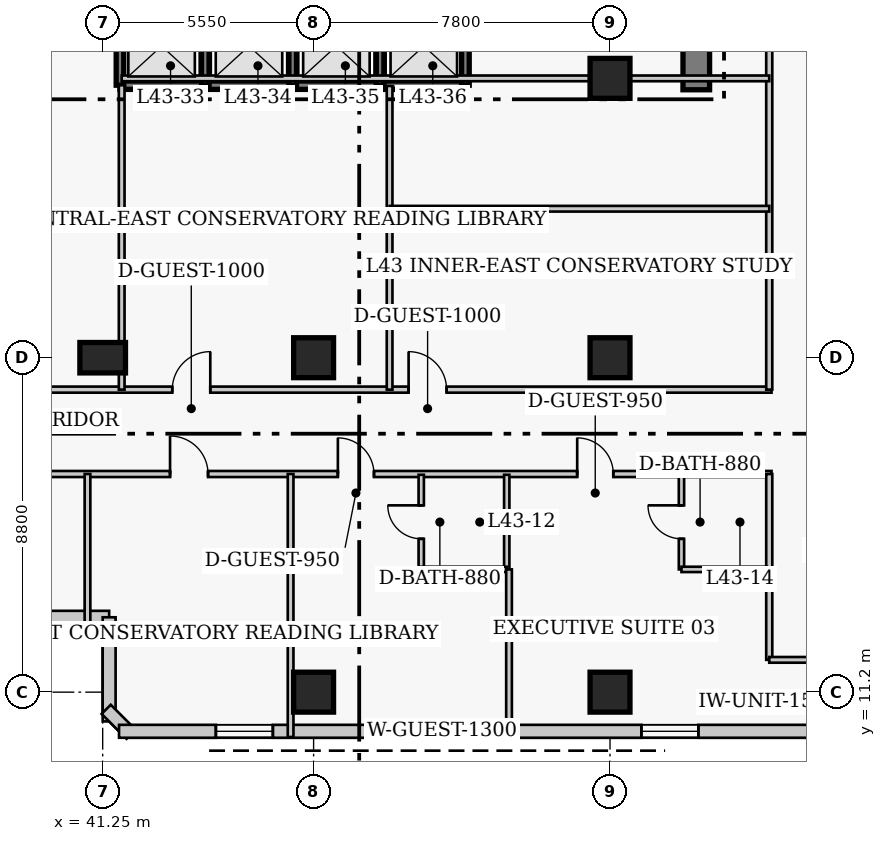
"""IFC4 building model, lengths in metres.
Left out: names, types, materials, properties, quantities, classifications, styles, units other than length and angle.
Written with IfcOpenShell. Run it as: python <this file> out.ifc"""

import sys

from ifc_helpers import new_model, si_unit, direction, frame, frame_2d, origin, origin_2d, place, context, subcontext, project, spatial, rectangle, extrude, element, fill, save


model = new_model("IFC4")
c1 = context("Model", 3, precision=1e-05, world=origin(), true_north=direction((0.0, 1.0)))
c2 = subcontext(c1, "Body", "Model", "MODEL_VIEW")
j1 = project(units=[si_unit("LENGTHUNIT", "METRE"), si_unit("PLANEANGLEUNIT", "RADIAN")], contexts=[c1])
p1 = place(None, origin())
s1 = spatial("IfcSite", under=j1, at=p1, CompositionType="ELEMENT")
p2 = place(p1, origin())
s2 = spatial("IfcBuilding", under=s1, at=p2, CompositionType="ELEMENT")
p3 = place(p2, frame((0.0, 0.0, 172.6)))
s3 = spatial("IfcBuildingStorey", under=s2, at=p3, CompositionType="ELEMENT", Elevation=172.6)
p4 = place(p3, frame((56.87, 27.05, 0.0), z_axis=(0.0, 0.0, 1.0), x_axis=(0.0, 1.0, 0.0)))
e1 = element("IfcWall", 1, at=p4, inside=s3, PredefinedType="SHEAR", context=c2, shape_type="SweptSolid", body=[
    extrude(rectangle(XDim=13.62, YDim=0.7, at=frame_2d((6.81, 0.0))), origin(), (0.0, 0.0, 1.0), 3.8),
])
p5 = place(p3, frame((41.25, 20.0, 0.0), z_axis=(0.0, 0.0, 1.0), x_axis=(1.0, 0.0, 0.0)))
e2 = element("IfcColumn", 2, at=p5, inside=s3, PredefinedType="COLUMN", context=c2, shape_type="SweptSolid", body=[
    extrude(rectangle(XDim=1.2, YDim=0.8, at=origin_2d()), origin(), (0.0, 0.0, 1.0), 3.8),
])
for number, where, z_axis, x_axis in (
    (3, (46.8, 11.2, 0.0), (0.0, 0.0, 1.0), (1.0, 0.0, 0.0)),
    (4, (46.8, 20.0, 0.0), (0.0, 0.0, 1.0), (1.0, 0.0, 0.0)),
    (5, (54.6, 11.2, 0.0), (0.0, 0.0, 1.0), (1.0, 0.0, 0.0)),
    (6, (54.6, 20.0, 0.0), (0.0, 0.0, 1.0), (1.0, 0.0, 0.0)),
    (7, (54.6, 27.35, 0.0), (0.0, 0.0, 1.0), (1.0, 0.0, 0.0)),
):
    element("IfcColumn", number, at=place(p3, frame(where, z_axis=z_axis, x_axis=x_axis)), inside=s3, PredefinedType="COLUMN", context=c2, shape_type="SweptSolid", body=[
        extrude(rectangle(XDim=1.05, YDim=1.05, at=origin_2d()), origin(), (0.0, 0.0, 1.0), 3.8),
    ])
p6 = place(p3, frame((36.58, 13.17, 0.0), z_axis=(0.0, 0.0, 1.0), x_axis=(1.0, 0.0, 0.0)))
e8 = element("IfcWall", 8, at=p6, inside=s3, PredefinedType="SOLIDWALL", context=c2, shape_type="SweptSolid", body=[
    extrude(rectangle(XDim=4.84, YDim=0.34, at=frame_2d((2.42, 0.0))), origin(), (0.0, 0.0, 1.0), 3.55),
])
p7 = place(p6, frame((1.67, 0.0, 0.85)))
e9 = element("IfcOpeningElement", 9, at=p7, cuts=e8, PredefinedType="OPENING", context=c2, shape_type="SweptSolid", body=[
    extrude(rectangle(XDim=1.5, YDim=1.75, at=frame_2d((0.75, 0.875))), frame((0.0, 0.18, 0.0), z_axis=(0.0, -1.0, 0.0), x_axis=(1.0, 0.0, 0.0)), (0.0, 0.0, 1.0), 0.36),
])
p8 = place(p3, frame((41.42, 13.17, 0.0), z_axis=(0.0, 0.0, 1.0), x_axis=(0.0, -1.0, 0.0)))
e10 = element("IfcWall", 10, at=p8, inside=s3, PredefinedType="SOLIDWALL", context=c2, shape_type="SweptSolid", body=[
    extrude(rectangle(XDim=2.74, YDim=0.34, at=frame_2d((1.37, 0.0))), origin(), (0.0, 0.0, 1.0), 3.55),
])
p9 = place(p3, frame((41.342, 10.749, 0.0), z_axis=(0.0, 0.0, 1.0), x_axis=(0.707106781187, -0.707106781187, 0.0)))
e11 = element("IfcWall", 11, at=p9, inside=s3, PredefinedType="SOLIDWALL", context=c2, shape_type="SweptSolid", body=[
    extrude(rectangle(XDim=0.929, YDim=0.34, at=frame_2d((0.464, 0.0))), origin(), (0.0, 0.0, 1.0), 3.55),
])
p10 = place(p3, frame((41.68, 10.17, 0.0), z_axis=(0.0, 0.0, 1.0), x_axis=(1.0, 0.0, 0.0)))
e12 = element("IfcWall", 12, at=p10, inside=s3, PredefinedType="SOLIDWALL", context=c2, shape_type="SweptSolid", body=[
    extrude(rectangle(XDim=26.69, YDim=0.34, at=frame_2d((13.345, 0.0))), origin(), (0.0, 0.0, 1.0), 3.55),
])
p11 = place(p10, frame((2.548, 0.0, 0.85)))
e13 = element("IfcOpeningElement", 13, at=p11, cuts=e12, PredefinedType="OPENING", context=c2, shape_type="SweptSolid", body=[
    extrude(rectangle(XDim=1.5, YDim=1.75, at=frame_2d((0.75, 0.875))), frame((0.0, 0.18, 0.0), z_axis=(0.0, -1.0, 0.0), x_axis=(1.0, 0.0, 0.0)), (0.0, 0.0, 1.0), 0.36),
])
p12 = place(p10, frame((13.745, 0.0, 0.85)))
e14 = element("IfcOpeningElement", 14, at=p12, cuts=e12, PredefinedType="OPENING", context=c2, shape_type="SweptSolid", body=[
    extrude(rectangle(XDim=1.5, YDim=1.75, at=frame_2d((0.75, 0.875))), frame((0.0, 0.18, 0.0), z_axis=(0.0, -1.0, 0.0), x_axis=(1.0, 0.0, 0.0)), (0.0, 0.0, 1.0), 0.36),
])
p13 = place(p10, frame((21.492, 0.0, 0.85)))
e15 = element("IfcOpeningElement", 15, at=p13, cuts=e12, PredefinedType="OPENING", context=c2, shape_type="SweptSolid", body=[
    extrude(rectangle(XDim=1.5, YDim=1.75, at=frame_2d((0.75, 0.875))), frame((0.0, 0.18, 0.0), z_axis=(0.0, -1.0, 0.0), x_axis=(1.0, 0.0, 0.0)), (0.0, 0.0, 1.0), 0.36),
])
p14 = place(p10, frame((6.749, 0.0, 0.85)))
e16 = element("IfcOpeningElement", 16, at=p14, cuts=e12, PredefinedType="OPENING", context=c2, shape_type="SweptSolid", body=[
    extrude(rectangle(XDim=1.3, YDim=1.7, at=frame_2d((0.65, 0.85))), frame((0.0, 0.18, 0.0), z_axis=(0.0, -1.0, 0.0), x_axis=(1.0, 0.0, 0.0)), (0.0, 0.0, 1.0), 0.36),
])
p15 = place(p3, frame((41.705, 27.17, 0.0), z_axis=(0.0, 0.0, 1.0), x_axis=(1.0, 0.0, 0.0)))
e17 = element("IfcWall", 17, at=p15, inside=s3, PredefinedType="SHEAR", context=c2, shape_type="SweptSolid", body=[
    extrude(rectangle(XDim=2.245, YDim=0.22, at=frame_2d((1.123, 0.0))), origin(), (0.0, 0.0, 1.0), 3.8),
])
p16 = place(p3, frame((41.705, 27.17, 0.0), z_axis=(0.0, 0.0, 1.0), x_axis=(0.0, 1.0, 0.0)))
e18 = element("IfcWall", 18, at=p16, inside=s3, PredefinedType="SHEAR", context=c2, shape_type="SweptSolid", body=[
    extrude(rectangle(XDim=2.06, YDim=0.2, at=frame_2d((1.03, 0.0))), origin(), (0.0, 0.0, 1.0), 3.8),
])
p17 = place(p3, frame((43.95, 27.17, 0.0), z_axis=(0.0, 0.0, 1.0), x_axis=(1.0, 0.0, 0.0)))
e19 = element("IfcWall", 19, at=p17, inside=s3, PredefinedType="SHEAR", context=c2, shape_type="SweptSolid", body=[
    extrude(rectangle(XDim=2.3, YDim=0.22, at=frame_2d((1.15, 0.0))), origin(), (0.0, 0.0, 1.0), 3.8),
])
p18 = place(p3, frame((43.95, 27.17, 0.0), z_axis=(0.0, 0.0, 1.0), x_axis=(0.0, 1.0, 0.0)))
e20 = element("IfcWall", 20, at=p18, inside=s3, PredefinedType="SHEAR", context=c2, shape_type="SweptSolid", body=[
    extrude(rectangle(XDim=2.06, YDim=0.2, at=frame_2d((1.03, 0.0))), origin(), (0.0, 0.0, 1.0), 3.8),
])
p19 = place(p3, frame((46.25, 27.17, 0.0), z_axis=(0.0, 0.0, 1.0), x_axis=(1.0, 0.0, 0.0)))
e21 = element("IfcWall", 21, at=p19, inside=s3, PredefinedType="SHEAR", context=c2, shape_type="SweptSolid", body=[
    extrude(rectangle(XDim=2.3, YDim=0.22, at=frame_2d((1.15, 0.0))), origin(), (0.0, 0.0, 1.0), 3.8),
])
p20 = place(p3, frame((46.25, 27.17, 0.0), z_axis=(0.0, 0.0, 1.0), x_axis=(0.0, 1.0, 0.0)))
e22 = element("IfcWall", 22, at=p20, inside=s3, PredefinedType="SHEAR", context=c2, shape_type="SweptSolid", body=[
    extrude(rectangle(XDim=2.06, YDim=0.2, at=frame_2d((1.03, 0.0))), origin(), (0.0, 0.0, 1.0), 3.8),
])
p21 = place(p3, frame((48.55, 27.17, 0.0), z_axis=(0.0, 0.0, 1.0), x_axis=(1.0, 0.0, 0.0)))
e23 = element("IfcWall", 23, at=p21, inside=s3, PredefinedType="SHEAR", context=c2, shape_type="SweptSolid", body=[
    extrude(rectangle(XDim=2.245, YDim=0.22, at=frame_2d((1.123, 0.0))), origin(), (0.0, 0.0, 1.0), 3.8),
])
for number, where, z_axis, x_axis in (
    (24, (48.55, 27.17, 0.0), (0.0, 0.0, 1.0), (0.0, 1.0, 0.0)),
    (25, (50.795, 27.17, 0.0), (0.0, 0.0, 1.0), (0.0, 1.0, 0.0)),
):
    element("IfcWall", number, at=place(p3, frame(where, z_axis=z_axis, x_axis=x_axis)), inside=s3, PredefinedType="SHEAR", context=c2, shape_type="SweptSolid", body=[
        extrude(rectangle(XDim=2.06, YDim=0.2, at=frame_2d((1.03, 0.0))), origin(), (0.0, 0.0, 1.0), 3.8),
    ])
p22 = place(p3, frame((35.85, 19.16, 0.0), z_axis=(0.0, 0.0, 1.0), x_axis=(1.0, 0.0, 0.0)))
e26 = element("IfcWall", 26, at=p22, inside=s3, PredefinedType="PARTITIONING", context=c2, shape_type="SweptSolid", body=[
    extrude(rectangle(XDim=23.0, YDim=0.16, at=frame_2d((11.5, 0.0))), origin(), (0.0, 0.0, 1.0), 3.55),
])
p23 = place(p22, frame((7.231, 0.0, 0.0)))
e27 = element("IfcOpeningElement", 27, at=p23, cuts=e26, PredefinedType="OPENING", context=c2, shape_type="SweptSolid", body=[
    extrude(rectangle(XDim=1.0, YDim=2.15, at=frame_2d((0.5, 1.075))), frame((0.0, 0.09, 0.0), z_axis=(0.0, -1.0, 0.0), x_axis=(1.0, 0.0, 0.0)), (0.0, 0.0, 1.0), 0.18),
])
p24 = place(p22, frame((13.45, 0.0, 0.0)))
e28 = element("IfcOpeningElement", 28, at=p24, cuts=e26, PredefinedType="OPENING", context=c2, shape_type="SweptSolid", body=[
    extrude(rectangle(XDim=1.0, YDim=2.15, at=frame_2d((0.5, 1.075))), frame((0.0, 0.09, 0.0), z_axis=(0.0, -1.0, 0.0), x_axis=(1.0, 0.0, 0.0)), (0.0, 0.0, 1.0), 0.18),
])
p25 = place(p3, frame((35.8, 16.94, 0.0), z_axis=(0.0, 0.0, 1.0), x_axis=(1.0, 0.0, 0.0)))
e29 = element("IfcWall", 29, at=p25, inside=s3, PredefinedType="PARTITIONING", context=c2, shape_type="SweptSolid", body=[
    extrude(rectangle(XDim=23.05, YDim=0.16, at=frame_2d((11.525, 0.0))), origin(), (0.0, 0.0, 1.0), 3.55),
])
p26 = place(p25, frame((7.222, 0.0, 0.0)))
e30 = element("IfcOpeningElement", 30, at=p26, cuts=e29, PredefinedType="OPENING", context=c2, shape_type="SweptSolid", body=[
    extrude(rectangle(XDim=1.0, YDim=2.15, at=frame_2d((0.5, 1.075))), frame((0.0, 0.09, 0.0), z_axis=(0.0, -1.0, 0.0), x_axis=(1.0, 0.0, 0.0)), (0.0, 0.0, 1.0), 0.18),
])
p27 = place(p25, frame((11.639, 0.0, 0.0)))
e31 = element("IfcOpeningElement", 31, at=p27, cuts=e29, PredefinedType="OPENING", context=c2, shape_type="SweptSolid", body=[
    extrude(rectangle(XDim=0.95, YDim=2.1, at=frame_2d((0.475, 1.05))), frame((0.0, 0.09, 0.0), z_axis=(0.0, -1.0, 0.0), x_axis=(1.0, 0.0, 0.0)), (0.0, 0.0, 1.0), 0.18),
])
p28 = place(p25, frame((17.936, 0.0, 0.0)))
e32 = element("IfcOpeningElement", 32, at=p28, cuts=e29, PredefinedType="OPENING", context=c2, shape_type="SweptSolid", body=[
    extrude(rectangle(XDim=0.95, YDim=2.1, at=frame_2d((0.475, 1.05))), frame((0.0, 0.09, 0.0), z_axis=(0.0, -1.0, 0.0), x_axis=(1.0, 0.0, 0.0)), (0.0, 0.0, 1.0), 0.18),
])
p29 = place(p3, frame((58.79, 19.16, 0.0), z_axis=(0.0, 0.0, 1.0), x_axis=(0.0, 1.0, 0.0)))
e33 = element("IfcWall", 33, at=p29, inside=s3, PredefinedType="PARTITIONING", context=c2, shape_type="SweptSolid", body=[
    extrude(rectangle(XDim=21.49, YDim=0.16, at=frame_2d((10.745, 0.0))), origin(), (0.0, 0.0, 1.0), 3.55),
])
p30 = place(p3, frame((58.79, 12.05, 0.0), z_axis=(0.0, 0.0, 1.0), x_axis=(0.0, 1.0, 0.0)))
e34 = element("IfcWall", 34, at=p30, inside=s3, PredefinedType="PARTITIONING", context=c2, shape_type="SweptSolid", body=[
    extrude(rectangle(XDim=4.89, YDim=0.16, at=frame_2d((2.445, 0.0))), origin(), (0.0, 0.0, 1.0), 3.55),
])
p31 = place(p3, frame((58.79, 12.05, 0.0), z_axis=(0.0, 0.0, 1.0), x_axis=(1.0, 0.0, 0.0)))
e35 = element("IfcWall", 35, at=p31, inside=s3, PredefinedType="PARTITIONING", context=c2, shape_type="SweptSolid", body=[
    extrude(rectangle(XDim=2.22, YDim=0.15, at=frame_2d((1.11, 0.0))), origin(), (0.0, 0.0, 1.0), 3.55),
])
p32 = place(p3, frame((41.75, 19.16, 0.0), z_axis=(0.0, 0.0, 1.0), x_axis=(0.0, 1.0, 0.0)))
e36 = element("IfcWall", 36, at=p32, inside=s3, PredefinedType="PARTITIONING", context=c2, shape_type="SweptSolid", body=[
    extrude(rectangle(XDim=8.01, YDim=0.15, at=frame_2d((4.005, 0.0))), origin(), (0.0, 0.0, 1.0), 3.55),
])
p33 = place(p3, frame((48.8, 19.16, 0.0), z_axis=(0.0, 0.0, 1.0), x_axis=(0.0, 1.0, 0.0)))
e37 = element("IfcWall", 37, at=p33, inside=s3, PredefinedType="PARTITIONING", context=c2, shape_type="SweptSolid", body=[
    extrude(rectangle(XDim=7.99, YDim=0.15, at=frame_2d((3.995, 0.0))), origin(), (0.0, 0.0, 1.0), 3.55),
])
p34 = place(p3, frame((41.75, 27.35, 0.0), z_axis=(0.0, 0.0, 1.0), x_axis=(1.0, 0.0, 0.0)))
e38 = element("IfcWall", 38, at=p34, inside=s3, PredefinedType="PARTITIONING", context=c2, shape_type="SweptSolid", body=[
    extrude(rectangle(XDim=17.04, YDim=0.15, at=frame_2d((8.52, 0.0))), origin(), (0.0, 0.0, 1.0), 3.55),
])
p35 = place(p3, frame((48.8, 23.92, 0.0), z_axis=(0.0, 0.0, 1.0), x_axis=(1.0, 0.0, 0.0)))
e39 = element("IfcWall", 39, at=p35, inside=s3, PredefinedType="PARTITIONING", context=c2, shape_type="SweptSolid", body=[
    extrude(rectangle(XDim=9.99, YDim=0.15, at=frame_2d((4.995, 0.0))), origin(), (0.0, 0.0, 1.0), 3.55),
])
p36 = place(p3, frame((40.85, 13.02, 0.0), z_axis=(0.0, 0.0, 1.0), x_axis=(0.0, 1.0, 0.0)))
e40 = element("IfcWall", 40, at=p36, inside=s3, PredefinedType="PARTITIONING", context=c2, shape_type="SweptSolid", body=[
    extrude(rectangle(XDim=3.92, YDim=0.15, at=frame_2d((1.96, 0.0))), origin(), (0.0, 0.0, 1.0), 3.55),
])
p37 = place(p3, frame((46.195, 10.02, 0.0), z_axis=(0.0, 0.0, 1.0), x_axis=(0.0, 1.0, 0.0)))
e41 = element("IfcWall", 41, at=p37, inside=s3, PredefinedType="PARTITIONING", context=c2, shape_type="SweptSolid", body=[
    extrude(rectangle(XDim=6.92, YDim=0.15, at=frame_2d((3.46, 0.0))), origin(), (0.0, 0.0, 1.0), 3.55),
])
p38 = place(p3, frame((49.633, 14.43, 0.0), z_axis=(0.0, 0.0, 1.0), x_axis=(0.0, 1.0, 0.0)))
e42 = element("IfcWall", 42, at=p38, inside=s3, PredefinedType="PLUMBINGWALL", context=c2, shape_type="SweptSolid", body=[
    extrude(rectangle(XDim=2.49, YDim=0.14, at=frame_2d((1.245, 0.0))), origin(), (0.0, 0.0, 1.0), 3.55),
])
p39 = place(p38, frame((0.805, 0.0, 0.0)))
e43 = element("IfcOpeningElement", 43, at=p39, cuts=e42, PredefinedType="OPENING", context=c2, shape_type="SweptSolid", body=[
    extrude(rectangle(XDim=0.88, YDim=2.05, at=frame_2d((0.44, 1.025))), frame((0.0, 0.08, 0.0), z_axis=(0.0, -1.0, 0.0), x_axis=(1.0, 0.0, 0.0)), (0.0, 0.0, 1.0), 0.16),
])
p40 = place(p3, frame((51.883, 14.43, 0.0), z_axis=(0.0, 0.0, 1.0), x_axis=(0.0, 1.0, 0.0)))
e44 = element("IfcWall", 44, at=p40, inside=s3, PredefinedType="PLUMBINGWALL", context=c2, shape_type="SweptSolid", body=[
    extrude(rectangle(XDim=2.49, YDim=0.14, at=frame_2d((1.245, 0.0))), origin(), (0.0, 0.0, 1.0), 3.55),
])
p41 = place(p3, frame((49.633, 14.43, 0.0), z_axis=(0.0, 0.0, 1.0), x_axis=(1.0, 0.0, 0.0)))
e45 = element("IfcWall", 45, at=p41, inside=s3, PredefinedType="PLUMBINGWALL", context=c2, shape_type="SweptSolid", body=[
    extrude(rectangle(XDim=2.25, YDim=0.14, at=frame_2d((1.125, 0.0))), origin(), (0.0, 0.0, 1.0), 3.55),
])
p42 = place(p3, frame((51.942, 10.02, 0.0), z_axis=(0.0, 0.0, 1.0), x_axis=(0.0, 1.0, 0.0)))
e46 = element("IfcWall", 46, at=p42, inside=s3, PredefinedType="PARTITIONING", context=c2, shape_type="SweptSolid", body=[
    extrude(rectangle(XDim=4.41, YDim=0.15, at=frame_2d((2.205, 0.0))), origin(), (0.0, 0.0, 1.0), 3.55),
])
p43 = place(p3, frame((56.48, 14.43, 0.0), z_axis=(0.0, 0.0, 1.0), x_axis=(0.0, 1.0, 0.0)))
e47 = element("IfcWall", 47, at=p43, inside=s3, PredefinedType="PLUMBINGWALL", context=c2, shape_type="SweptSolid", body=[
    extrude(rectangle(XDim=2.49, YDim=0.14, at=frame_2d((1.245, 0.0))), origin(), (0.0, 0.0, 1.0), 3.55),
])
p44 = place(p43, frame((0.805, 0.0, 0.0)))
e48 = element("IfcOpeningElement", 48, at=p44, cuts=e47, PredefinedType="OPENING", context=c2, shape_type="SweptSolid", body=[
    extrude(rectangle(XDim=0.88, YDim=2.05, at=frame_2d((0.44, 1.025))), frame((0.0, 0.08, 0.0), z_axis=(0.0, -1.0, 0.0), x_axis=(1.0, 0.0, 0.0)), (0.0, 0.0, 1.0), 0.16),
])
p45 = place(p3, frame((56.48, 14.43, 0.0), z_axis=(0.0, 0.0, 1.0), x_axis=(1.0, 0.0, 0.0)))
e49 = element("IfcWall", 49, at=p45, inside=s3, PredefinedType="PLUMBINGWALL", context=c2, shape_type="SweptSolid", body=[
    extrude(rectangle(XDim=2.25, YDim=0.14, at=frame_2d((1.125, 0.0))), origin(), (0.0, 0.0, 1.0), 3.55),
])
p46 = place(p11, origin())
e50 = element("IfcWindow", 50, at=p46, inside=s3, PartitioningType="SINGLE_PANEL", PredefinedType="WINDOW", context=c2, shape_type="SweptSolid", body=[
    extrude(rectangle(XDim=1.5, YDim=1.75, at=frame_2d((0.75, 0.875))), frame((0.0, 0.03, 0.0), z_axis=(0.0, -1.0, 0.0), x_axis=(1.0, 0.0, 0.0)), (0.0, 0.0, 1.0), 0.06),
])
fill(e13, e50)
p47 = place(p12, origin())
e51 = element("IfcWindow", 51, at=p47, inside=s3, PartitioningType="SINGLE_PANEL", PredefinedType="WINDOW", context=c2, shape_type="SweptSolid", body=[
    extrude(rectangle(XDim=1.5, YDim=1.75, at=frame_2d((0.75, 0.875))), frame((0.0, 0.03, 0.0), z_axis=(0.0, -1.0, 0.0), x_axis=(1.0, 0.0, 0.0)), (0.0, 0.0, 1.0), 0.06),
])
fill(e14, e51)
p48 = place(p14, origin())
e52 = element("IfcWindow", 52, at=p48, inside=s3, PartitioningType="SINGLE_PANEL", PredefinedType="WINDOW", context=c2, shape_type="SweptSolid", body=[
    extrude(rectangle(XDim=1.3, YDim=1.7, at=frame_2d((0.65, 0.85))), frame((0.0, 0.03, 0.0), z_axis=(0.0, -1.0, 0.0), x_axis=(1.0, 0.0, 0.0)), (0.0, 0.0, 1.0), 0.06),
])
fill(e16, e52)
p49 = place(p23, origin())
e53 = element("IfcDoor", 53, at=p49, inside=s3, OperationType="SINGLE_SWING_RIGHT", PredefinedType="DOOR", context=c2, shape_type="SweptSolid", body=[
    extrude(rectangle(XDim=1.0, YDim=2.15, at=frame_2d((0.5, 1.075))), frame((0.0, 0.025, 0.0), z_axis=(0.0, -1.0, 0.0), x_axis=(1.0, 0.0, 0.0)), (0.0, 0.0, 1.0), 0.05),
])
fill(e27, e53)
p50 = place(p24, origin())
e54 = element("IfcDoor", 54, at=p50, inside=s3, OperationType="SINGLE_SWING_LEFT", PredefinedType="DOOR", context=c2, shape_type="SweptSolid", body=[
    extrude(rectangle(XDim=1.0, YDim=2.15, at=frame_2d((0.5, 1.075))), frame((0.0, 0.025, 0.0), z_axis=(0.0, -1.0, 0.0), x_axis=(1.0, 0.0, 0.0)), (0.0, 0.0, 1.0), 0.05),
])
fill(e28, e54)
p51 = place(p26, origin())
e55 = element("IfcDoor", 55, at=p51, inside=s3, OperationType="SINGLE_SWING_LEFT", PredefinedType="DOOR", context=c2, shape_type="SweptSolid", body=[
    extrude(rectangle(XDim=1.0, YDim=2.15, at=frame_2d((0.5, 1.075))), frame((0.0, 0.025, 0.0), z_axis=(0.0, -1.0, 0.0), x_axis=(1.0, 0.0, 0.0)), (0.0, 0.0, 1.0), 0.05),
])
fill(e30, e55)
p52 = place(p39, origin())
e56 = element("IfcDoor", 56, at=p52, inside=s3, OperationType="SINGLE_SWING_RIGHT", PredefinedType="DOOR", context=c2, shape_type="SweptSolid", body=[
    extrude(rectangle(XDim=0.88, YDim=2.05, at=frame_2d((0.44, 1.025))), frame((0.0, 0.025, 0.0), z_axis=(0.0, -1.0, 0.0), x_axis=(1.0, 0.0, 0.0)), (0.0, 0.0, 1.0), 0.05),
])
fill(e43, e56)
p53 = place(p27, origin())
e57 = element("IfcDoor", 57, at=p53, inside=s3, OperationType="SINGLE_SWING_LEFT", PredefinedType="DOOR", context=c2, shape_type="SweptSolid", body=[
    extrude(rectangle(XDim=0.95, YDim=2.1, at=frame_2d((0.475, 1.05))), frame((0.0, 0.025, 0.0), z_axis=(0.0, -1.0, 0.0), x_axis=(1.0, 0.0, 0.0)), (0.0, 0.0, 1.0), 0.05),
])
fill(e31, e57)
p54 = place(p44, origin())
e58 = element("IfcDoor", 58, at=p54, inside=s3, OperationType="SINGLE_SWING_RIGHT", PredefinedType="DOOR", context=c2, shape_type="SweptSolid", body=[
    extrude(rectangle(XDim=0.88, YDim=2.05, at=frame_2d((0.44, 1.025))), frame((0.0, 0.025, 0.0), z_axis=(0.0, -1.0, 0.0), x_axis=(1.0, 0.0, 0.0)), (0.0, 0.0, 1.0), 0.05),
])
fill(e48, e58)
p55 = place(p28, origin())
e59 = element("IfcDoor", 59, at=p55, inside=s3, OperationType="SINGLE_SWING_LEFT", PredefinedType="DOOR", context=c2, shape_type="SweptSolid", body=[
    extrude(rectangle(XDim=0.95, YDim=2.1, at=frame_2d((0.475, 1.05))), frame((0.0, 0.025, 0.0), z_axis=(0.0, -1.0, 0.0), x_axis=(1.0, 0.0, 0.0)), (0.0, 0.0, 1.0), 0.05),
])
fill(e32, e59)
save(model, sys.argv[1])
